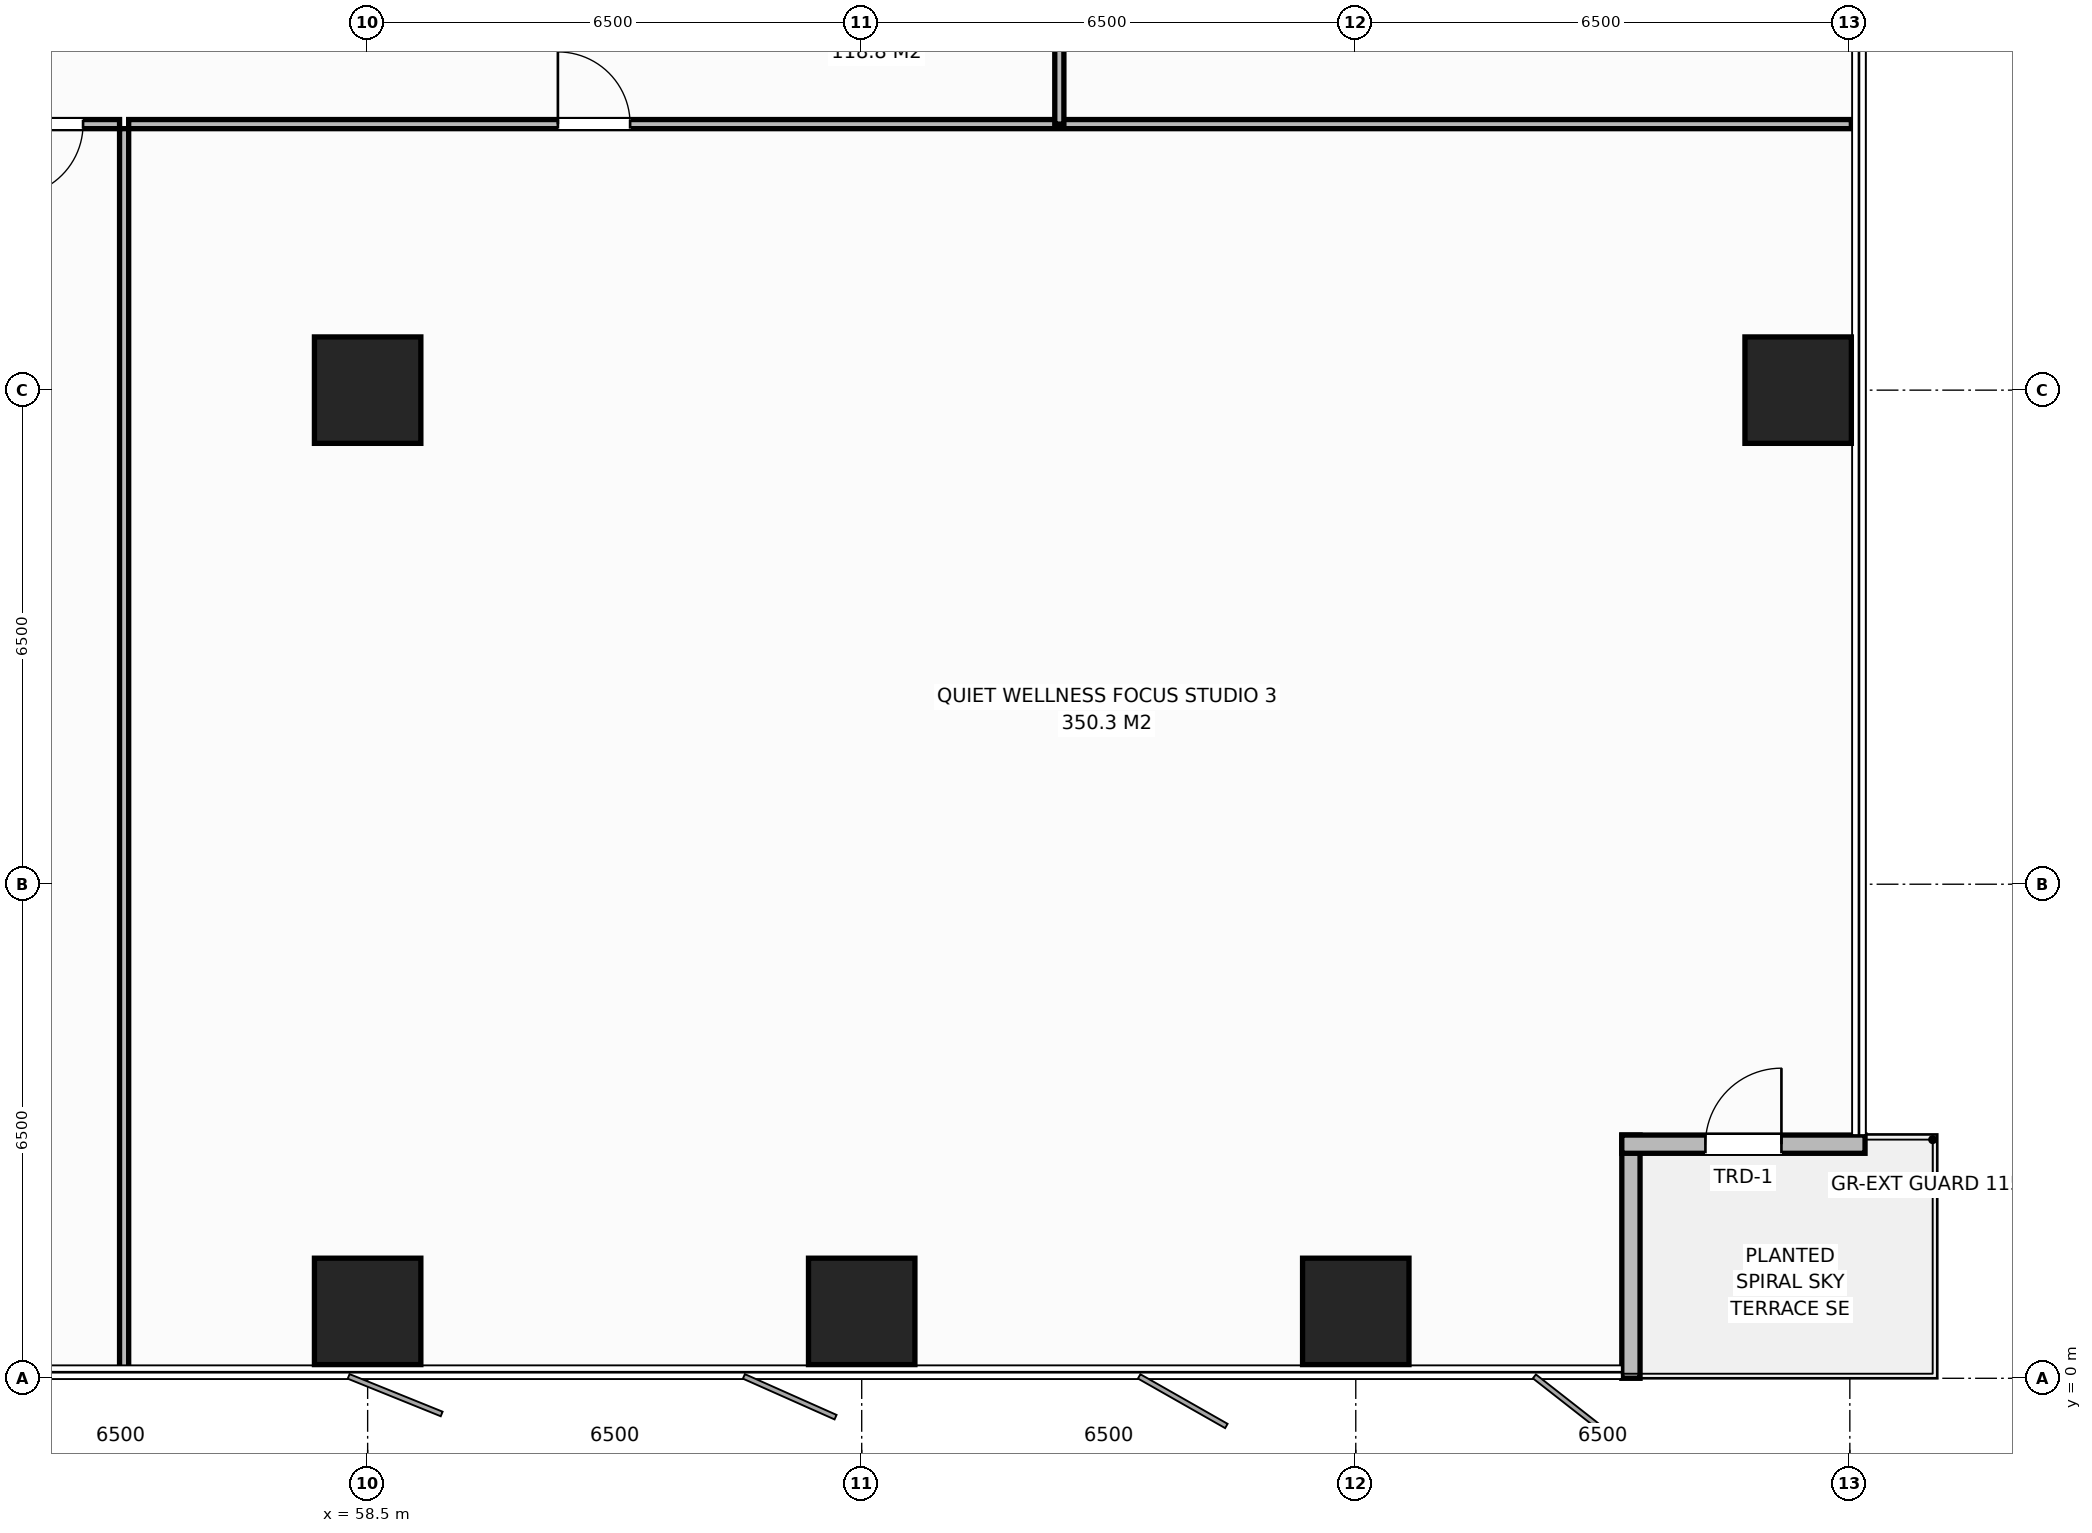
"""IFC4 building model, lengths in metres.
Left out: names, types, materials, properties, quantities, classifications, styles, units other than length and angle.
Written with IfcOpenShell. Run it as: python <this file> out.ifc"""

import sys

from ifc_helpers import new_model, si_unit, direction, frame, frame_2d, origin, origin_2d, place, context, subcontext, project, spatial, rectangle, extrude, element, fill, save


model = new_model("IFC4")
c1 = context("Model", 3, precision=1e-05, world=origin(), true_north=direction((0.0, 1.0)))
c2 = subcontext(c1, "Body", "Model", "MODEL_VIEW")
j1 = project(units=[si_unit("LENGTHUNIT", "METRE"), si_unit("PLANEANGLEUNIT", "RADIAN")], contexts=[c1])
p1 = place(None, origin())
s1 = spatial("IfcSite", under=j1, at=p1, CompositionType="ELEMENT")
p2 = place(p1, origin())
s2 = spatial("IfcBuilding", under=s1, at=p2, CompositionType="ELEMENT")
p3 = place(p2, frame((0.0, 0.0, 43.0)))
s3 = spatial("IfcBuildingStorey", under=s2, at=p3, CompositionType="ELEMENT", Elevation=43.0)
for number, where, z_axis, x_axis in (
    (1, (58.5, 13.0, 0.0), (0.0, 0.0, 1.0), (1.0, 0.0, 0.0)),
    (2, (58.5, 0.88, 0.0), (0.0, 0.0, 1.0), (1.0, 0.0, 0.0)),
    (3, (65.0, 0.88, 0.0), (0.0, 0.0, 1.0), (1.0, 0.0, 0.0)),
    (4, (71.5, 0.88, 0.0), (0.0, 0.0, 1.0), (1.0, 0.0, 0.0)),
    (5, (77.32, 13.0, 0.0), (0.0, 0.0, 1.0), (1.0, 0.0, 0.0)),
):
    element("IfcColumn", number, at=place(p3, frame(where, z_axis=z_axis, x_axis=x_axis)), inside=s3, PredefinedType="COLUMN", context=c2, shape_type="SweptSolid", body=[
        extrude(rectangle(XDim=1.4, YDim=1.4, at=origin_2d()), origin(), (0.0, 0.0, 1.0), 3.8),
    ])
p4 = place(p3, frame((75.12, 3.2, 0.0), z_axis=(0.0, 0.0, 1.0), x_axis=(0.0, -1.0, 0.0)))
e6 = element("IfcWall", 6, at=p4, inside=s3, PredefinedType="STANDARD", context=c2, shape_type="SweptSolid", body=[
    extrude(rectangle(XDim=3.2, YDim=0.24, at=frame_2d((1.6, 0.0))), origin(), (0.0, 0.0, 1.0), 3.55),
])
p5 = place(p3, frame((78.2, 3.08, 0.0), z_axis=(0.0, 0.0, 1.0), x_axis=(-1.0, 0.0, 0.0)))
e7 = element("IfcWall", 7, at=p5, inside=s3, PredefinedType="STANDARD", context=c2, shape_type="SweptSolid", body=[
    extrude(rectangle(XDim=3.2, YDim=0.24, at=frame_2d((1.6, 0.0))), origin(), (0.0, 0.0, 1.0), 3.55),
])
p6 = place(p5, frame((1.1, 0.0, 0.0)))
e8 = element("IfcOpeningElement", 8, at=p6, cuts=e7, PredefinedType="OPENING", context=c2, shape_type="SweptSolid", body=[
    extrude(rectangle(XDim=1.0, YDim=2.2, at=frame_2d((0.5, 1.1))), frame((0.0, 0.13, 0.0), z_axis=(0.0, -1.0, 0.0), x_axis=(1.0, 0.0, 0.0)), (0.0, 0.0, 1.0), 0.26),
])
p7 = place(p3, frame((55.296, 0.02, 0.0), z_axis=(0.0, 0.0, 1.0), x_axis=(0.0, 1.0, 0.0)))
e9 = element("IfcWall", 9, at=p7, inside=s3, PredefinedType="PARTITIONING", context=c2, shape_type="SweptSolid", body=[
    extrude(rectangle(XDim=16.42, YDim=0.12, at=frame_2d((8.21, 0.0))), origin(), (0.0, 0.0, 1.0), 3.55),
])
p8 = place(p3, frame((39.26, 16.5, 0.0), z_axis=(0.0, 0.0, 1.0), x_axis=(1.0, 0.0, 0.0)))
e10 = element("IfcWall", 10, at=p8, inside=s3, PredefinedType="PARTITIONING", context=c2, shape_type="SweptSolid", body=[
    extrude(rectangle(XDim=15.976, YDim=0.12, at=frame_2d((7.988, 0.0))), origin(), (0.0, 0.0, 1.0), 3.55),
])
p9 = place(p8, frame((14.546, 0.0, 0.0)))
e11 = element("IfcOpeningElement", 11, at=p9, cuts=e10, PredefinedType="OPENING", context=c2, shape_type="SweptSolid", body=[
    extrude(rectangle(XDim=0.95, YDim=2.15, at=frame_2d((0.475, 1.075))), frame((0.0, 0.07, 0.0), z_axis=(0.0, -1.0, 0.0), x_axis=(1.0, 0.0, 0.0)), (0.0, 0.0, 1.0), 0.14),
])
p10 = place(p3, frame((55.356, 16.5, 0.0), z_axis=(0.0, 0.0, 1.0), x_axis=(1.0, 0.0, 0.0)))
e12 = element("IfcWall", 12, at=p10, inside=s3, PredefinedType="PARTITIONING", context=c2, shape_type="SweptSolid", body=[
    extrude(rectangle(XDim=22.664, YDim=0.12, at=frame_2d((11.332, 0.0))), origin(), (0.0, 0.0, 1.0), 3.55),
])
p11 = place(p10, frame((5.647, 0.0, 0.0)))
e13 = element("IfcOpeningElement", 13, at=p11, cuts=e12, PredefinedType="OPENING", context=c2, shape_type="SweptSolid", body=[
    extrude(rectangle(XDim=0.95, YDim=2.15, at=frame_2d((0.475, 1.075))), frame((0.0, 0.07, 0.0), z_axis=(0.0, -1.0, 0.0), x_axis=(1.0, 0.0, 0.0)), (0.0, 0.0, 1.0), 0.14),
])
p12 = place(p3, frame((67.6, 16.5, 0.0), z_axis=(0.0, 0.0, 1.0), x_axis=(0.0, 1.0, 0.0)))
e14 = element("IfcWall", 14, at=p12, inside=s3, PredefinedType="PARTITIONING", context=c2, shape_type="SweptSolid", body=[
    extrude(rectangle(XDim=19.0, YDim=0.12, at=frame_2d((9.5, 0.0))), origin(), (0.0, 0.0, 1.0), 3.55),
])
p13 = place(p12, frame((9.025, 0.0, 0.0)))
e15 = element("IfcOpeningElement", 15, at=p13, cuts=e14, PredefinedType="OPENING", context=c2, shape_type="SweptSolid", body=[
    extrude(rectangle(XDim=0.95, YDim=2.15, at=frame_2d((0.475, 1.075))), frame((0.0, 0.07, 0.0), z_axis=(0.0, -1.0, 0.0), x_axis=(1.0, 0.0, 0.0)), (0.0, 0.0, 1.0), 0.14),
])
p14 = place(p6, origin())
e16 = element("IfcDoor", 16, at=p14, inside=s3, OperationType="SINGLE_SWING_RIGHT", PredefinedType="DOOR", context=c2, shape_type="SweptSolid", body=[
    extrude(rectangle(XDim=1.0, YDim=2.2, at=frame_2d((0.5, 1.1))), frame((0.0, 0.025, 0.0), z_axis=(0.0, -1.0, 0.0), x_axis=(1.0, 0.0, 0.0)), (0.0, 0.0, 1.0), 0.05),
])
fill(e8, e16)
p15 = place(p9, origin())
e17 = element("IfcDoor", 17, at=p15, inside=s3, OperationType="SINGLE_SWING_RIGHT", PredefinedType="DOOR", context=c2, shape_type="SweptSolid", body=[
    extrude(rectangle(XDim=0.95, YDim=2.15, at=frame_2d((0.475, 1.075))), frame((0.0, 0.025, 0.0), z_axis=(0.0, -1.0, 0.0), x_axis=(1.0, 0.0, 0.0)), (0.0, 0.0, 1.0), 0.05),
])
fill(e11, e17)
p16 = place(p11, origin())
e18 = element("IfcDoor", 18, at=p16, inside=s3, OperationType="SINGLE_SWING_LEFT", PredefinedType="DOOR", context=c2, shape_type="SweptSolid", body=[
    extrude(rectangle(XDim=0.95, YDim=2.15, at=frame_2d((0.475, 1.075))), frame((0.0, 0.025, 0.0), z_axis=(0.0, -1.0, 0.0), x_axis=(1.0, 0.0, 0.0)), (0.0, 0.0, 1.0), 0.05),
])
fill(e13, e18)
save(model, sys.argv[1])
